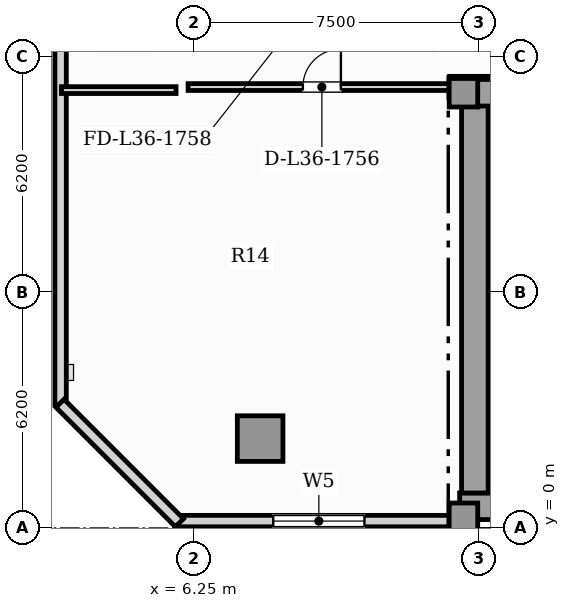
"""IFC4 building model, lengths in metres.
Left out: names, types, materials, properties, quantities, classifications, styles, units other than length and angle.
Written with IfcOpenShell. Run it as: python <this file> out.ifc"""

import sys

from ifc_helpers import new_model, si_unit, direction, frame, frame_2d, origin, origin_2d, place, context, subcontext, project, spatial, rectangle, hollow_rectangle, extrude, element, fill, save


model = new_model("IFC4")
c1 = context("Model", 3, precision=1e-05, world=origin(), true_north=direction((0.0, 1.0)))
c2 = subcontext(c1, "Body", "Model", "MODEL_VIEW")
j1 = project(units=[si_unit("LENGTHUNIT", "METRE"), si_unit("PLANEANGLEUNIT", "RADIAN")], contexts=[c1])
p1 = place(None, origin())
s1 = spatial("IfcSite", under=j1, at=p1, CompositionType="ELEMENT")
p2 = place(p1, origin())
s2 = spatial("IfcBuilding", under=s1, at=p2, CompositionType="ELEMENT")
p3 = place(p2, frame((0.0, 0.0, 149.05)))
s3 = spatial("IfcBuildingStorey", under=s2, at=p3, CompositionType="ELEMENT", Elevation=149.05)
p4 = place(p3, frame((13.25, 0.57, 0.0), z_axis=(0.0, 0.0, 1.0), x_axis=(1.0, 0.0, 0.0)))
e1 = element("IfcWall", 1, at=p4, inside=s3, PredefinedType="SHEAR", context=c2, shape_type="SweptSolid", body=[
    extrude(rectangle(XDim=31.0, YDim=0.7, at=frame_2d((15.5, 0.0))), origin(), (0.0, 0.0, 1.0), 3.63),
])
p5 = place(p3, frame((13.65, 0.92, 0.0), z_axis=(0.0, 0.0, 1.0), x_axis=(0.0, 1.0, 0.0)))
e2 = element("IfcWall", 2, at=p5, inside=s3, PredefinedType="SHEAR", context=c2, shape_type="SweptSolid", body=[
    extrude(rectangle(XDim=10.53, YDim=0.7, at=frame_2d((5.265, 0.0))), origin(), (0.0, 0.0, 1.0), 3.63),
])
p6 = place(p3, frame((13.25, 11.45, 0.0), z_axis=(0.0, 0.0, 1.0), x_axis=(1.0, 0.0, 0.0)))
e3 = element("IfcWall", 3, at=p6, inside=s3, PredefinedType="SHEAR", context=c2, shape_type="SweptSolid", body=[
    extrude(rectangle(XDim=2.95, YDim=0.7, at=frame_2d((1.475, 0.0))), origin(), (0.0, 0.0, 1.0), 3.63),
])
for number, where, z_axis, x_axis in (
    (4, (13.35, 0.28, 0.0), (0.0, 0.0, 1.0), (1.0, 0.0, 0.0)),
    (5, (13.35, 11.45, 0.0), (0.0, 0.0, 1.0), (1.0, 0.0, 0.0)),
):
    element("IfcColumn", number, at=place(p3, frame(where, z_axis=z_axis, x_axis=x_axis)), inside=s3, PredefinedType="COLUMN", context=c2, shape_type="SweptSolid", body=[
        extrude(rectangle(XDim=0.75, YDim=0.75, at=origin_2d()), origin(), (0.0, 0.0, 1.0), 3.85),
    ])
p7 = place(p3, frame((8.0, 2.35, 0.0), z_axis=(0.0, 0.0, 1.0), x_axis=(1.0, 0.0, 0.0)))
e6 = element("IfcColumn", 6, at=p7, inside=s3, PredefinedType="USERDEFINED", context=c2, shape_type="SweptSolid", body=[
    extrude(hollow_rectangle(XDim=1.2, YDim=1.2, WallThickness=0.07, at=origin_2d()), origin(), (0.0, 0.0, 1.0), 3.85),
])
p8 = place(p3, frame((5.84, 0.18, 0.0), z_axis=(0.0, 0.0, 1.0), x_axis=(1.0, 0.0, 0.0)))
e7 = element("IfcWall", 7, at=p8, inside=s3, PredefinedType="SOLIDWALL", context=c2, shape_type="SweptSolid", body=[
    extrude(rectangle(XDim=7.41, YDim=0.3, at=frame_2d((3.705, 0.0))), origin(), (0.0, 0.0, 1.0), 3.63),
])
p9 = place(p8, frame((2.505, 0.0, 0.85)))
e8 = element("IfcOpeningElement", 8, at=p9, cuts=e7, PredefinedType="OPENING", context=c2, shape_type="SweptSolid", body=[
    extrude(rectangle(XDim=2.4, YDim=2.0, at=frame_2d((1.2, 1.0))), frame((0.0, 0.16, 0.0), z_axis=(0.0, -1.0, 0.0), x_axis=(1.0, 0.0, 0.0)), (0.0, 0.0, 1.0), 0.32),
])
p10 = place(p3, frame((2.75, 39.96, 0.0), z_axis=(0.0, 0.0, 1.0), x_axis=(0.0, -1.0, 0.0)))
e9 = element("IfcWall", 9, at=p10, inside=s3, PredefinedType="SOLIDWALL", context=c2, shape_type="SweptSolid", body=[
    extrude(rectangle(XDim=36.72, YDim=0.3, at=frame_2d((18.36, 0.0))), origin(), (0.0, 0.0, 1.0), 3.63),
])
p11 = place(p10, frame((5.26, 0.0, 0.95)))
e10 = element("IfcOpeningElement", 10, at=p11, cuts=e9, PredefinedType="OPENING", context=c2, shape_type="SweptSolid", body=[
    extrude(rectangle(XDim=0.9, YDim=1.5, at=frame_2d((0.45, 0.75))), frame((0.0, 0.16, 0.0), z_axis=(0.0, -1.0, 0.0), x_axis=(1.0, 0.0, 0.0)), (0.0, 0.0, 1.0), 0.32),
])
p12 = place(p10, frame((19.283, 0.0, 0.88)))
e11 = element("IfcOpeningElement", 11, at=p12, cuts=e9, PredefinedType="OPENING", context=c2, shape_type="SweptSolid", body=[
    extrude(rectangle(XDim=1.65, YDim=2.0, at=frame_2d((0.825, 1.0))), frame((0.0, 0.16, 0.0), z_axis=(0.0, -1.0, 0.0), x_axis=(1.0, 0.0, 0.0)), (0.0, 0.0, 1.0), 0.32),
])
p13 = place(p10, frame((11.663, 0.0, 0.88)))
e12 = element("IfcOpeningElement", 12, at=p13, cuts=e9, PredefinedType="OPENING", context=c2, shape_type="SweptSolid", body=[
    extrude(rectangle(XDim=1.65, YDim=2.0, at=frame_2d((0.825, 1.0))), frame((0.0, 0.16, 0.0), z_axis=(0.0, -1.0, 0.0), x_axis=(1.0, 0.0, 0.0)), (0.0, 0.0, 1.0), 0.32),
])
p14 = place(p3, frame((2.734, 3.278, 0.0), z_axis=(0.0, 0.0, 1.0), x_axis=(0.707106781187, -0.707106781187, 0.0)))
e13 = element("IfcWall", 13, at=p14, inside=s3, PredefinedType="SOLIDWALL", context=c2, shape_type="SweptSolid", body=[
    extrude(rectangle(XDim=4.445, YDim=0.3, at=frame_2d((2.223, 0.0))), origin(), (0.0, 0.0, 1.0), 3.63),
])
p15 = place(p3, frame((14.04, 8.52, 0.0), z_axis=(0.0, 0.0, 1.0), x_axis=(1.0, 0.0, 0.0)))
e14 = element("IfcWall", 14, at=p15, inside=s3, PredefinedType="SOLIDWALL", context=c2, shape_type="SweptSolid", body=[
    extrude(rectangle(XDim=3.4, YDim=0.22, at=frame_2d((1.7, 0.0))), origin(), (0.0, 0.0, 1.0), 3.63),
])
p16 = place(p15, frame((1.125, 0.0, 0.0)))
e15 = element("IfcOpeningElement", 15, at=p16, cuts=e14, PredefinedType="OPENING", context=c2, shape_type="SweptSolid", body=[
    extrude(rectangle(XDim=1.15, YDim=2.2, at=frame_2d((0.575, 1.1))), frame((0.0, 0.12, 0.0), z_axis=(0.0, -1.0, 0.0), x_axis=(1.0, 0.0, 0.0)), (0.0, 0.0, 1.0), 0.24),
])
p17 = place(p3, frame((6.105, 11.6, 0.0), z_axis=(0.0, 0.0, 1.0), x_axis=(1.0, 0.0, 0.0)))
e16 = element("IfcWall", 16, at=p17, inside=s3, PredefinedType="PARTITIONING", context=c2, shape_type="SweptSolid", body=[
    extrude(rectangle(XDim=7.04, YDim=0.18, at=frame_2d((3.52, 0.0))), origin(), (0.0, 0.0, 1.0), 3.63),
])
p18 = place(p17, frame((3.02, 0.0, 0.0)))
e17 = element("IfcOpeningElement", 17, at=p18, cuts=e16, PredefinedType="OPENING", context=c2, shape_type="SweptSolid", body=[
    extrude(rectangle(XDim=1.0, YDim=2.15, at=frame_2d((0.5, 1.075))), frame((0.0, 0.1, 0.0), z_axis=(0.0, -1.0, 0.0), x_axis=(1.0, 0.0, 0.0)), (0.0, 0.0, 1.0), 0.2),
])
p19 = place(p3, frame((2.772, 11.52, 0.0), z_axis=(0.0, 0.0, 1.0), x_axis=(1.0, 0.0, 0.0)))
e18 = element("IfcWall", 18, at=p19, inside=s3, PredefinedType="PARTITIONING", context=c2, shape_type="SweptSolid", body=[
    extrude(rectangle(XDim=3.015, YDim=0.18, at=frame_2d((1.508, 0.0))), origin(), (0.0, 0.0, 1.0), 3.63),
])
p20 = place(p9, origin())
e19 = element("IfcWindow", 19, at=p20, inside=s3, PartitioningType="SINGLE_PANEL", PredefinedType="WINDOW", context=c2, shape_type="SweptSolid", body=[
    extrude(rectangle(XDim=2.4, YDim=2.0, at=frame_2d((1.2, 1.0))), frame((0.0, 0.03, 0.0), z_axis=(0.0, -1.0, 0.0), x_axis=(1.0, 0.0, 0.0)), (0.0, 0.0, 1.0), 0.06),
])
fill(e8, e19)
p21 = place(p18, origin())
e20 = element("IfcDoor", 20, at=p21, inside=s3, OperationType="SINGLE_SWING_RIGHT", PredefinedType="DOOR", context=c2, shape_type="SweptSolid", body=[
    extrude(rectangle(XDim=1.0, YDim=2.15, at=frame_2d((0.5, 1.075))), frame((0.0, 0.025, 0.0), z_axis=(0.0, -1.0, 0.0), x_axis=(1.0, 0.0, 0.0)), (0.0, 0.0, 1.0), 0.05),
])
fill(e17, e20)
save(model, sys.argv[1])
